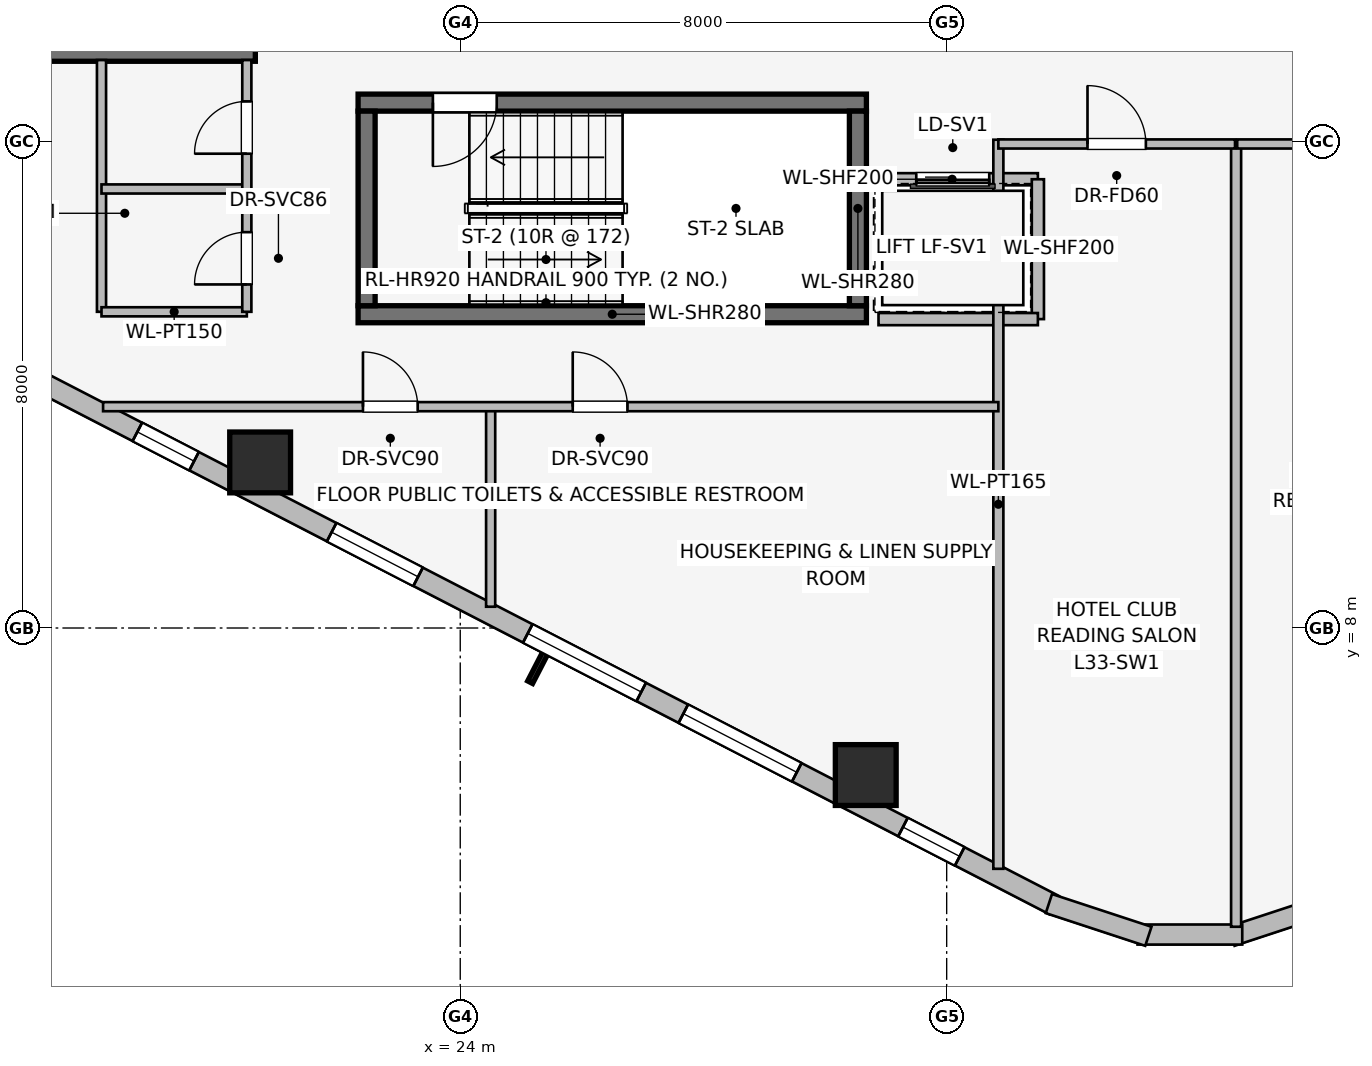
"""IFC4 building model, lengths in metres.
Left out: names, types, materials, properties, quantities, classifications, styles, units other than length and angle.
Written with IfcOpenShell. Run it as: python <this file> out.ifc"""

import sys

from ifc_helpers import new_model, si_unit, direction, frame, frame_2d, origin, origin_2d, place, context, subcontext, project, spatial, rectangle, extrude, element, fill, save


model = new_model("IFC4")
c1 = context("Model", 3, precision=1e-05, world=origin(), true_north=direction((0.0, 1.0)))
c2 = subcontext(c1, "Body", "Model", "MODEL_VIEW")
j1 = project(units=[si_unit("LENGTHUNIT", "METRE"), si_unit("PLANEANGLEUNIT", "RADIAN")], contexts=[c1])
p1 = place(None, origin())
s1 = spatial("IfcSite", under=j1, at=p1, CompositionType="ELEMENT")
p2 = place(p1, origin())
s2 = spatial("IfcBuilding", under=s1, at=p2, CompositionType="ELEMENT")
p3 = place(p2, frame((0.0, 0.0, 125.7)))
s3 = spatial("IfcBuildingStorey", under=s2, at=p3, CompositionType="ELEMENT", Elevation=125.7)
p4 = place(p3, frame((16.87, 17.46, 0.0), z_axis=(0.0, 0.0, 1.0), x_axis=(1.0, 0.0, 0.0)))
e1 = element("IfcWall", 1, at=p4, inside=s3, PredefinedType="SHEAR", context=c2, shape_type="SweptSolid", body=[
    extrude(rectangle(XDim=3.76, YDim=0.28, at=frame_2d((1.88, 0.0))), origin(), (0.0, 0.0, 1.0), 3.45),
])
p5 = place(p3, frame((22.32, 13.16, 0.0), z_axis=(0.0, 0.0, 1.0), x_axis=(1.0, 0.0, 0.0)))
e2 = element("IfcWall", 2, at=p5, inside=s3, PredefinedType="SHEAR", context=c2, shape_type="SweptSolid", body=[
    extrude(rectangle(XDim=8.36, YDim=0.28, at=frame_2d((4.18, 0.0))), origin(), (0.0, 0.0, 1.0), 3.45),
])
p6 = place(p3, frame((30.68, 16.64, 0.0), z_axis=(0.0, 0.0, 1.0), x_axis=(-1.0, 0.0, 0.0)))
e3 = element("IfcWall", 3, at=p6, inside=s3, PredefinedType="SHEAR", context=c2, shape_type="SweptSolid", body=[
    extrude(rectangle(XDim=8.36, YDim=0.28, at=frame_2d((4.18, 0.0))), origin(), (0.0, 0.0, 1.0), 3.45),
])
p7 = place(p6, frame((6.08, 0.0, 0.0)))
e4 = element("IfcOpeningElement", 4, at=p7, cuts=e3, PredefinedType="OPENING", context=c2, shape_type="SweptSolid", body=[
    extrude(rectangle(XDim=1.05, YDim=2.0, at=frame_2d((0.525, 1.0))), frame((0.0, 0.15, 0.0), z_axis=(0.0, -1.0, 0.0), x_axis=(1.0, 0.0, 0.0)), (0.0, 0.0, 1.0), 0.3),
])
for number, where, z_axis, x_axis in (
    (5, (22.46, 16.5, 0.0), (0.0, 0.0, 1.0), (0.0, -1.0, 0.0)),
    (6, (30.54, 13.3, 0.0), (0.0, 0.0, 1.0), (0.0, 1.0, 0.0)),
):
    element("IfcWall", number, at=place(p3, frame(where, z_axis=z_axis, x_axis=x_axis)), inside=s3, PredefinedType="SHEAR", context=c2, shape_type="SweptSolid", body=[
        extrude(rectangle(XDim=3.2, YDim=0.28, at=frame_2d((1.6, 0.0))), origin(), (0.0, 0.0, 1.0), 3.45),
    ])
for number, where, z_axis, x_axis in (
    (7, (20.709, 10.723, 0.0), (0.0, 0.0, 1.0), (1.0, 0.0, 0.0)),
    (8, (30.669, 5.582, 0.0), (0.0, 0.0, 1.0), (1.0, 0.0, 0.0)),
):
    element("IfcColumn", number, at=place(p3, frame(where, z_axis=z_axis, x_axis=x_axis)), inside=s3, PredefinedType="COLUMN", context=c2, shape_type="SweptSolid", body=[
        extrude(rectangle(XDim=1.0, YDim=1.0, at=origin_2d()), origin(), (0.0, 0.0, 1.0), 3.45),
    ])
p8 = place(p3, frame((17.243, 11.95, 0.0), z_axis=(0.0, 0.0, 1.0), x_axis=(-0.790621329885, 0.612305408053, 0.0)))
e9 = element("IfcWall", 9, at=p8, inside=s3, PredefinedType="STANDARD", context=c2, shape_type="SweptSolid", body=[
    extrude(rectangle(XDim=1.676, YDim=0.33, at=frame_2d((0.838, 0.0))), origin(), (0.0, 0.0, 1.0), 3.19),
])
p9 = place(p3, frame((33.769, 3.442, 0.0), z_axis=(0.0, 0.0, 1.0), x_axis=(-0.888613612362, 0.458656568606, 0.0)))
e10 = element("IfcWall", 10, at=p9, inside=s3, PredefinedType="STANDARD", context=c2, shape_type="SweptSolid", body=[
    extrude(rectangle(XDim=18.681, YDim=0.34, at=frame_2d((9.34, 0.0))), origin(), (0.0, 0.0, 1.0), 3.19),
])
p10 = place(p9, frame((1.75, 0.0, 0.75)))
e11 = element("IfcOpeningElement", 11, at=p10, cuts=e10, PredefinedType="OPENING", context=c2, shape_type="SweptSolid", body=[
    extrude(rectangle(XDim=1.05, YDim=1.4, at=frame_2d((0.525, 0.7))), frame((0.0, 0.18, 0.0), z_axis=(0.0, -1.0, 0.0), x_axis=(1.0, 0.0, 0.0)), (0.0, 0.0, 1.0), 0.36),
])
p11 = place(p9, frame((4.765, 0.0, 0.75)))
e12 = element("IfcOpeningElement", 12, at=p11, cuts=e10, PredefinedType="OPENING", context=c2, shape_type="SweptSolid", body=[
    extrude(rectangle(XDim=2.1, YDim=1.5, at=frame_2d((1.05, 0.75))), frame((0.0, 0.18, 0.0), z_axis=(0.0, -1.0, 0.0), x_axis=(1.0, 0.0, 0.0)), (0.0, 0.0, 1.0), 0.36),
])
p12 = place(p9, frame((7.644, 0.0, 0.75)))
e13 = element("IfcOpeningElement", 13, at=p12, cuts=e10, PredefinedType="OPENING", context=c2, shape_type="SweptSolid", body=[
    extrude(rectangle(XDim=2.1, YDim=1.5, at=frame_2d((1.05, 0.75))), frame((0.0, 0.18, 0.0), z_axis=(0.0, -1.0, 0.0), x_axis=(1.0, 0.0, 0.0)), (0.0, 0.0, 1.0), 0.36),
])
p13 = place(p9, frame((11.774, 0.0, 0.75)))
e14 = element("IfcOpeningElement", 14, at=p13, cuts=e10, PredefinedType="OPENING", context=c2, shape_type="SweptSolid", body=[
    extrude(rectangle(XDim=1.6, YDim=1.55, at=frame_2d((0.8, 0.775))), frame((0.0, 0.18, 0.0), z_axis=(0.0, -1.0, 0.0), x_axis=(1.0, 0.0, 0.0)), (0.0, 0.0, 1.0), 0.36),
])
p14 = place(p9, frame((15.92, 0.0, 0.75)))
e15 = element("IfcOpeningElement", 15, at=p14, cuts=e10, PredefinedType="OPENING", context=c2, shape_type="SweptSolid", body=[
    extrude(rectangle(XDim=1.05, YDim=1.4, at=frame_2d((0.525, 0.7))), frame((0.0, 0.18, 0.0), z_axis=(0.0, -1.0, 0.0), x_axis=(1.0, 0.0, 0.0)), (0.0, 0.0, 1.0), 0.36),
])
for number, where, z_axis, x_axis in (
    (16, (38.319, 3.468, 0.0), (0.0, 0.0, 1.0), (-0.95, -0.312, 0.0)),
    (17, (36.861, 2.959, 0.0), (0.0, 0.0, 1.0), (-1.0, 0.0, 0.0)),
    (18, (35.317, 2.93, 0.0), (0.0, 0.0, 1.0), (-0.95, 0.312, 0.0)),
):
    element("IfcWall", number, at=place(p3, frame(where, z_axis=z_axis, x_axis=x_axis)), inside=s3, PredefinedType="STANDARD", context=c2, shape_type="SweptSolid", body=[
        extrude(rectangle(XDim=1.722, YDim=0.33, at=frame_2d((0.861, 0.0))), origin(), (0.0, 0.0, 1.0), 3.19),
    ])
p15 = place(p3, frame((33.5, 15.38, 0.0), z_axis=(0.0, 0.0, 1.0), x_axis=(-1.0, 0.0, 0.0)))
e19 = element("IfcWall", 19, at=p15, inside=s3, PredefinedType="PARTITIONING", context=c2, shape_type="SweptSolid", body=[
    extrude(rectangle(XDim=2.82, YDim=0.2, at=frame_2d((1.41, 0.0))), origin(), (0.0, 0.0, 1.0), 3.19),
])
p16 = place(p15, frame((0.8, 0.0, 0.0)))
e20 = element("IfcOpeningElement", 20, at=p16, cuts=e19, PredefinedType="OPENING", context=c2, shape_type="SweptSolid", body=[
    extrude(rectangle(XDim=1.2, YDim=2.2, at=frame_2d((0.6, 1.1))), frame((0.0, 0.11, 0.0), z_axis=(0.0, -1.0, 0.0), x_axis=(1.0, 0.0, 0.0)), (0.0, 0.0, 1.0), 0.22),
])
p17 = place(p3, frame((33.5, 13.08, 0.0), z_axis=(0.0, 0.0, 1.0), x_axis=(0.0, 1.0, 0.0)))
e21 = element("IfcWall", 21, at=p17, inside=s3, PredefinedType="PARTITIONING", context=c2, shape_type="SweptSolid", body=[
    extrude(rectangle(XDim=2.3, YDim=0.2, at=frame_2d((1.15, 0.0))), origin(), (0.0, 0.0, 1.0), 3.19),
])
p18 = place(p3, frame((30.879, 13.08, 0.0), z_axis=(0.0, 0.0, 1.0), x_axis=(1.0, 0.0, 0.0)))
e22 = element("IfcWall", 22, at=p18, inside=s3, PredefinedType="PARTITIONING", context=c2, shape_type="SweptSolid", body=[
    extrude(rectangle(XDim=2.621, YDim=0.2, at=frame_2d((1.311, 0.0))), origin(), (0.0, 0.0, 1.0), 3.19),
])
p19 = place(p3, frame((18.1, 17.34, 0.0), z_axis=(0.0, 0.0, 1.0), x_axis=(0.0, -1.0, 0.0)))
e23 = element("IfcWall", 23, at=p19, inside=s3, PredefinedType="PARTITIONING", context=c2, shape_type="SweptSolid", body=[
    extrude(rectangle(XDim=4.14, YDim=0.15, at=frame_2d((2.07, 0.0))), origin(), (0.0, 0.0, 1.0), 3.19),
])
for number, where, z_axis, x_axis in (
    (24, (18.1, 13.2, 0.0), (0.0, 0.0, 1.0), (1.0, 0.0, 0.0)),
    (25, (18.1, 15.22, 0.0), (0.0, 0.0, 1.0), (1.0, 0.0, 0.0)),
):
    element("IfcWall", number, at=place(p3, frame(where, z_axis=z_axis, x_axis=x_axis)), inside=s3, PredefinedType="PARTITIONING", context=c2, shape_type="SweptSolid", body=[
        extrude(rectangle(XDim=2.39, YDim=0.15, at=frame_2d((1.195, 0.0))), origin(), (0.0, 0.0, 1.0), 3.19),
    ])
p20 = place(p3, frame((20.49, 13.2, 0.0), z_axis=(0.0, 0.0, 1.0), x_axis=(0.0, 1.0, 0.0)))
e26 = element("IfcWall", 26, at=p20, inside=s3, PredefinedType="PARTITIONING", context=c2, shape_type="SweptSolid", body=[
    extrude(rectangle(XDim=4.14, YDim=0.15, at=frame_2d((2.07, 0.0))), origin(), (0.0, 0.0, 1.0), 3.19),
])
p21 = place(p20, frame((0.45, 0.0, 0.0)))
e27 = element("IfcOpeningElement", 27, at=p21, cuts=e26, PredefinedType="OPENING", context=c2, shape_type="SweptSolid", body=[
    extrude(rectangle(XDim=0.86, YDim=2.0, at=frame_2d((0.43, 1.0))), frame((0.0, 0.085, 0.0), z_axis=(0.0, -1.0, 0.0), x_axis=(1.0, 0.0, 0.0)), (0.0, 0.0, 1.0), 0.17),
])
p22 = place(p20, frame((2.6, 0.0, 0.0)))
e28 = element("IfcOpeningElement", 28, at=p22, cuts=e26, PredefinedType="OPENING", context=c2, shape_type="SweptSolid", body=[
    extrude(rectangle(XDim=0.86, YDim=2.0, at=frame_2d((0.43, 1.0))), frame((0.0, 0.085, 0.0), z_axis=(0.0, -1.0, 0.0), x_axis=(1.0, 0.0, 0.0)), (0.0, 0.0, 1.0), 0.17),
])
p23 = place(p3, frame((32.85, 4.04, 0.0), z_axis=(0.0, 0.0, 1.0), x_axis=(0.0, 1.0, 0.0)))
e29 = element("IfcWall", 29, at=p23, inside=s3, PredefinedType="PARTITIONING", context=c2, shape_type="SweptSolid", body=[
    extrude(rectangle(XDim=11.99, YDim=0.165, at=frame_2d((5.995, 0.0))), origin(), (0.0, 0.0, 1.0), 3.19),
])
p24 = place(p3, frame((24.5, 8.35, 0.0), z_axis=(0.0, 0.0, 1.0), x_axis=(0.0, 1.0, 0.0)))
e30 = element("IfcWall", 30, at=p24, inside=s3, PredefinedType="PARTITIONING", context=c2, shape_type="SweptSolid", body=[
    extrude(rectangle(XDim=3.29, YDim=0.15, at=frame_2d((1.645, 0.0))), origin(), (0.0, 0.0, 1.0), 3.19),
])
p25 = place(p3, frame((18.126, 11.64, 0.0), z_axis=(0.0, 0.0, 1.0), x_axis=(1.0, 0.0, 0.0)))
e31 = element("IfcWall", 31, at=p25, inside=s3, PredefinedType="PARTITIONING", context=c2, shape_type="SweptSolid", body=[
    extrude(rectangle(XDim=14.724, YDim=0.15, at=frame_2d((7.362, 0.0))), origin(), (0.0, 0.0, 1.0), 3.19),
])
p26 = place(p25, frame((4.274, 0.0, 0.0)))
e32 = element("IfcOpeningElement", 32, at=p26, cuts=e31, PredefinedType="OPENING", context=c2, shape_type="SweptSolid", body=[
    extrude(rectangle(XDim=0.9, YDim=2.0, at=frame_2d((0.45, 1.0))), frame((0.0, 0.085, 0.0), z_axis=(0.0, -1.0, 0.0), x_axis=(1.0, 0.0, 0.0)), (0.0, 0.0, 1.0), 0.17),
])
p27 = place(p25, frame((7.724, 0.0, 0.0)))
e33 = element("IfcOpeningElement", 33, at=p27, cuts=e31, PredefinedType="OPENING", context=c2, shape_type="SweptSolid", body=[
    extrude(rectangle(XDim=0.9, YDim=2.0, at=frame_2d((0.45, 1.0))), frame((0.0, 0.085, 0.0), z_axis=(0.0, -1.0, 0.0), x_axis=(1.0, 0.0, 0.0)), (0.0, 0.0, 1.0), 0.17),
])
p28 = place(p3, frame((36.76, 3.087, 0.0), z_axis=(0.0, 0.0, 1.0), x_axis=(0.0, 1.0, 0.0)))
e34 = element("IfcWall", 34, at=p28, inside=s3, PredefinedType="PARTITIONING", context=c2, shape_type="SweptSolid", body=[
    extrude(rectangle(XDim=12.843, YDim=0.165, at=frame_2d((6.421, 0.0))), origin(), (0.0, 0.0, 1.0), 3.19),
])
p29 = place(p3, frame((32.85, 15.96, 0.0), z_axis=(0.0, 0.0, 1.0), x_axis=(1.0, 0.0, 0.0)))
e35 = element("IfcWall", 35, at=p29, inside=s3, PredefinedType="PARTITIONING", context=c2, shape_type="SweptSolid", body=[
    extrude(rectangle(XDim=3.892, YDim=0.15, at=frame_2d((1.946, 0.0))), origin(), (0.0, 0.0, 1.0), 3.19),
])
p30 = place(p29, frame((1.466, 0.0, 0.0)))
e36 = element("IfcOpeningElement", 36, at=p30, cuts=e35, PredefinedType="OPENING", context=c2, shape_type="SweptSolid", body=[
    extrude(rectangle(XDim=0.96, YDim=2.0, at=frame_2d((0.48, 1.0))), frame((0.0, 0.085, 0.0), z_axis=(0.0, -1.0, 0.0), x_axis=(1.0, 0.0, 0.0)), (0.0, 0.0, 1.0), 0.17),
])
p31 = place(p3, frame((36.778, 15.96, 0.0), z_axis=(0.0, 0.0, 1.0), x_axis=(1.0, 0.0, 0.0)))
e37 = element("IfcWall", 37, at=p31, inside=s3, PredefinedType="PARTITIONING", context=c2, shape_type="SweptSolid", body=[
    extrude(rectangle(XDim=3.803, YDim=0.15, at=frame_2d((1.901, 0.0))), origin(), (0.0, 0.0, 1.0), 3.19),
])
p32 = place(p31, frame((1.422, 0.0, 0.0)))
e38 = element("IfcOpeningElement", 38, at=p32, cuts=e37, PredefinedType="OPENING", context=c2, shape_type="SweptSolid", body=[
    extrude(rectangle(XDim=0.96, YDim=2.0, at=frame_2d((0.48, 1.0))), frame((0.0, 0.085, 0.0), z_axis=(0.0, -1.0, 0.0), x_axis=(1.0, 0.0, 0.0)), (0.0, 0.0, 1.0), 0.17),
])
p33 = place(p10, origin())
e39 = element("IfcWindow", 39, at=p33, inside=s3, PartitioningType="SINGLE_PANEL", PredefinedType="WINDOW", context=c2, shape_type="SweptSolid", body=[
    extrude(rectangle(XDim=1.05, YDim=1.4, at=frame_2d((0.525, 0.7))), frame((0.0, 0.03, 0.0), z_axis=(0.0, -1.0, 0.0), x_axis=(1.0, 0.0, 0.0)), (0.0, 0.0, 1.0), 0.06),
])
fill(e11, e39)
p34 = place(p11, origin())
e40 = element("IfcWindow", 40, at=p34, inside=s3, PartitioningType="SINGLE_PANEL", PredefinedType="WINDOW", context=c2, shape_type="SweptSolid", body=[
    extrude(rectangle(XDim=2.1, YDim=1.5, at=frame_2d((1.05, 0.75))), frame((0.0, 0.03, 0.0), z_axis=(0.0, -1.0, 0.0), x_axis=(1.0, 0.0, 0.0)), (0.0, 0.0, 1.0), 0.06),
])
fill(e12, e40)
p35 = place(p12, origin())
e41 = element("IfcWindow", 41, at=p35, inside=s3, PartitioningType="SINGLE_PANEL", PredefinedType="WINDOW", context=c2, shape_type="SweptSolid", body=[
    extrude(rectangle(XDim=2.1, YDim=1.5, at=frame_2d((1.05, 0.75))), frame((0.0, 0.03, 0.0), z_axis=(0.0, -1.0, 0.0), x_axis=(1.0, 0.0, 0.0)), (0.0, 0.0, 1.0), 0.06),
])
fill(e13, e41)
p36 = place(p13, origin())
e42 = element("IfcWindow", 42, at=p36, inside=s3, PartitioningType="SINGLE_PANEL", PredefinedType="WINDOW", context=c2, shape_type="SweptSolid", body=[
    extrude(rectangle(XDim=1.6, YDim=1.55, at=frame_2d((0.8, 0.775))), frame((0.0, 0.03, 0.0), z_axis=(0.0, -1.0, 0.0), x_axis=(1.0, 0.0, 0.0)), (0.0, 0.0, 1.0), 0.06),
])
fill(e14, e42)
p37 = place(p14, origin())
e43 = element("IfcWindow", 43, at=p37, inside=s3, PartitioningType="SINGLE_PANEL", PredefinedType="WINDOW", context=c2, shape_type="SweptSolid", body=[
    extrude(rectangle(XDim=1.05, YDim=1.4, at=frame_2d((0.525, 0.7))), frame((0.0, 0.03, 0.0), z_axis=(0.0, -1.0, 0.0), x_axis=(1.0, 0.0, 0.0)), (0.0, 0.0, 1.0), 0.06),
])
fill(e15, e43)
p38 = place(p7, origin())
e44 = element("IfcDoor", 44, at=p38, inside=s3, OperationType="SINGLE_SWING_RIGHT", PredefinedType="DOOR", context=c2, shape_type="SweptSolid", body=[
    extrude(rectangle(XDim=1.05, YDim=2.0, at=frame_2d((0.525, 1.0))), frame((0.0, 0.025, 0.0), z_axis=(0.0, -1.0, 0.0), x_axis=(1.0, 0.0, 0.0)), (0.0, 0.0, 1.0), 0.05),
])
fill(e4, e44)
p39 = place(p16, origin())
e45 = element("IfcDoor", 45, at=p39, inside=s3, OperationType="SLIDING_TO_RIGHT", PredefinedType="DOOR", context=c2, shape_type="SweptSolid", body=[
    extrude(rectangle(XDim=1.2, YDim=2.2, at=frame_2d((0.6, 1.1))), frame((0.0, 0.025, 0.0), z_axis=(0.0, -1.0, 0.0), x_axis=(1.0, 0.0, 0.0)), (0.0, 0.0, 1.0), 0.05),
])
fill(e20, e45)
p40 = place(p21, origin())
e46 = element("IfcDoor", 46, at=p40, inside=s3, OperationType="SINGLE_SWING_LEFT", PredefinedType="DOOR", context=c2, shape_type="SweptSolid", body=[
    extrude(rectangle(XDim=0.86, YDim=2.0, at=frame_2d((0.43, 1.0))), frame((0.0, 0.025, 0.0), z_axis=(0.0, -1.0, 0.0), x_axis=(1.0, 0.0, 0.0)), (0.0, 0.0, 1.0), 0.05),
])
fill(e27, e46)
p41 = place(p22, origin())
e47 = element("IfcDoor", 47, at=p41, inside=s3, OperationType="SINGLE_SWING_LEFT", PredefinedType="DOOR", context=c2, shape_type="SweptSolid", body=[
    extrude(rectangle(XDim=0.86, YDim=2.0, at=frame_2d((0.43, 1.0))), frame((0.0, 0.025, 0.0), z_axis=(0.0, -1.0, 0.0), x_axis=(1.0, 0.0, 0.0)), (0.0, 0.0, 1.0), 0.05),
])
fill(e28, e47)
p42 = place(p26, origin())
e48 = element("IfcDoor", 48, at=p42, inside=s3, OperationType="SINGLE_SWING_LEFT", PredefinedType="DOOR", context=c2, shape_type="SweptSolid", body=[
    extrude(rectangle(XDim=0.9, YDim=2.0, at=frame_2d((0.45, 1.0))), frame((0.0, 0.025, 0.0), z_axis=(0.0, -1.0, 0.0), x_axis=(1.0, 0.0, 0.0)), (0.0, 0.0, 1.0), 0.05),
])
fill(e32, e48)
p43 = place(p27, origin())
e49 = element("IfcDoor", 49, at=p43, inside=s3, OperationType="SINGLE_SWING_LEFT", PredefinedType="DOOR", context=c2, shape_type="SweptSolid", body=[
    extrude(rectangle(XDim=0.9, YDim=2.0, at=frame_2d((0.45, 1.0))), frame((0.0, 0.025, 0.0), z_axis=(0.0, -1.0, 0.0), x_axis=(1.0, 0.0, 0.0)), (0.0, 0.0, 1.0), 0.05),
])
fill(e33, e49)
p44 = place(p30, origin())
e50 = element("IfcDoor", 50, at=p44, inside=s3, OperationType="SINGLE_SWING_LEFT", PredefinedType="DOOR", context=c2, shape_type="SweptSolid", body=[
    extrude(rectangle(XDim=0.96, YDim=2.0, at=frame_2d((0.48, 1.0))), frame((0.0, 0.025, 0.0), z_axis=(0.0, -1.0, 0.0), x_axis=(1.0, 0.0, 0.0)), (0.0, 0.0, 1.0), 0.05),
])
fill(e36, e50)
save(model, sys.argv[1])
